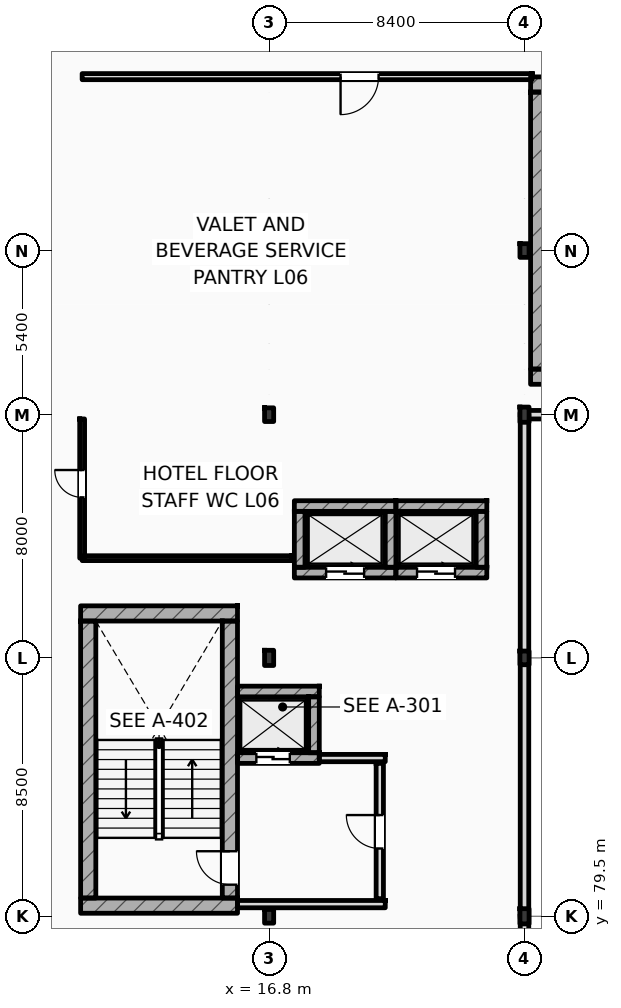
"""IFC4 building model, lengths in metres.
Left out: names, types, materials, properties, quantities, classifications, styles, units other than length and angle.
Written with IfcOpenShell. Run it as: python <this file> out.ifc"""

import sys

from ifc_helpers import new_model, si_unit, direction, frame, frame_2d, origin, origin_2d, place, context, subcontext, project, spatial, rectangle, i_section, extrude, element, fill, save


model = new_model("IFC4")
c1 = context("Model", 3, precision=1e-05, world=origin(), true_north=direction((0.0, 1.0)))
c2 = subcontext(c1, "Body", "Model", "MODEL_VIEW")
j1 = project(units=[si_unit("LENGTHUNIT", "METRE"), si_unit("PLANEANGLEUNIT", "RADIAN")], contexts=[c1])
p1 = place(None, origin())
s1 = spatial("IfcSite", under=j1, at=p1, CompositionType="ELEMENT")
p2 = place(p1, origin())
s2 = spatial("IfcBuilding", under=s1, at=p2, CompositionType="ELEMENT")
p3 = place(p2, frame((0.0, 0.0, 28.2)))
s3 = spatial("IfcBuildingStorey", under=s2, at=p3, CompositionType="ELEMENT", Elevation=28.2)
p4 = place(p3, frame((16.8, 79.5, 0.0), z_axis=(0.0, 0.0, 1.0), x_axis=(1.0, 0.0, 0.0)))
e1 = element("IfcColumn", 1, at=p4, inside=s3, PredefinedType="COLUMN", context=c2, shape_type="SweptSolid", body=[
    extrude(i_section(OverallWidth=0.3, OverallDepth=0.45, WebThickness=0.014, FlangeThickness=0.026, FilletRadius=0.027, at=origin_2d()), origin(), (0.0, 0.0, 1.0), 3.6),
])
p5 = place(p3, frame((16.8, 88.0, 0.0), z_axis=(0.0, 0.0, 1.0), x_axis=(1.0, 0.0, 0.0)))
e2 = element("IfcColumn", 2, at=p5, inside=s3, PredefinedType="COLUMN", context=c2, shape_type="SweptSolid", body=[
    extrude(i_section(OverallWidth=0.3, OverallDepth=0.5, WebThickness=0.014, FlangeThickness=0.028, FilletRadius=0.027, at=origin_2d()), origin(), (0.0, 0.0, 1.0), 3.6),
])
p6 = place(p3, frame((16.8, 96.0, 0.0), z_axis=(0.0, 0.0, 1.0), x_axis=(1.0, 0.0, 0.0)))
e3 = element("IfcColumn", 3, at=p6, inside=s3, PredefinedType="COLUMN", context=c2, shape_type="SweptSolid", body=[
    extrude(i_section(OverallWidth=0.3, OverallDepth=0.45, WebThickness=0.014, FlangeThickness=0.026, FilletRadius=0.027, at=origin_2d()), origin(), (0.0, 0.0, 1.0), 3.6),
])
p7 = place(p3, frame((25.2, 79.5, 0.0), z_axis=(0.0, 0.0, 1.0), x_axis=(1.0, 0.0, 0.0)))
e4 = element("IfcColumn", 4, at=p7, inside=s3, PredefinedType="COLUMN", context=c2, shape_type="SweptSolid", body=[
    extrude(i_section(OverallWidth=0.3, OverallDepth=0.5, WebThickness=0.014, FlangeThickness=0.028, FilletRadius=0.027, at=origin_2d()), origin(), (0.0, 0.0, 1.0), 3.6),
])
p8 = place(p3, frame((25.2, 88.0, 0.0), z_axis=(0.0, 0.0, 1.0), x_axis=(1.0, 0.0, 0.0)))
e5 = element("IfcColumn", 5, at=p8, inside=s3, PredefinedType="COLUMN", context=c2, shape_type="SweptSolid", body=[
    extrude(i_section(OverallWidth=0.3, OverallDepth=0.45, WebThickness=0.014, FlangeThickness=0.026, FilletRadius=0.027, at=origin_2d()), origin(), (0.0, 0.0, 1.0), 3.6),
])
p9 = place(p3, frame((25.2, 96.0, 0.0), z_axis=(0.0, 0.0, 1.0), x_axis=(1.0, 0.0, 0.0)))
e6 = element("IfcColumn", 6, at=p9, inside=s3, PredefinedType="COLUMN", context=c2, shape_type="SweptSolid", body=[
    extrude(i_section(OverallWidth=0.3, OverallDepth=0.5, WebThickness=0.014, FlangeThickness=0.028, FilletRadius=0.027, at=origin_2d()), origin(), (0.0, 0.0, 1.0), 3.6),
])
for number, where, z_axis, x_axis in (
    (7, (16.8, 101.4, 0.0), (0.0, 0.0, 1.0), (1.0, 0.0, 0.0)),
    (8, (25.2, 101.4, 0.0), (0.0, 0.0, 1.0), (1.0, 0.0, 0.0)),
):
    element("IfcColumn", number, at=place(p3, frame(where, z_axis=z_axis, x_axis=x_axis)), inside=s3, PredefinedType="COLUMN", context=c2, shape_type="SweptSolid", body=[
        extrude(i_section(OverallWidth=0.3, OverallDepth=0.45, WebThickness=0.014, FlangeThickness=0.026, FilletRadius=0.027, at=origin_2d()), origin(), (0.0, 0.0, 1.0), 3.6),
    ])
for number, where, z_axis, x_axis in (
    (9, (10.6, 89.462, 0.0), (0.0, 0.0, 1.0), (1.0, 0.0, 0.0)),
    (10, (10.6, 79.85, 0.0), (0.0, 0.0, 1.0), (1.0, 0.0, 0.0)),
):
    element("IfcWall", number, at=place(p3, frame(where, z_axis=z_axis, x_axis=x_axis)), inside=s3, PredefinedType="SHEAR", context=c2, shape_type="SweptSolid", body=[
        extrude(rectangle(XDim=5.16, YDim=0.5, at=frame_2d((2.58, 0.0))), origin(), (0.0, 0.0, 1.0), 3.6),
    ])
p10 = place(p3, frame((10.85, 80.1, 0.0), z_axis=(0.0, 0.0, 1.0), x_axis=(0.0, 1.0, 0.0)))
e11 = element("IfcWall", 11, at=p10, inside=s3, PredefinedType="SHEAR", context=c2, shape_type="SweptSolid", body=[
    extrude(rectangle(XDim=9.112, YDim=0.5, at=frame_2d((4.556, 0.0))), origin(), (0.0, 0.0, 1.0), 3.6),
])
p11 = place(p3, frame((15.51, 80.1, 0.0), z_axis=(0.0, 0.0, 1.0), x_axis=(0.0, 1.0, 0.0)))
e12 = element("IfcWall", 12, at=p11, inside=s3, PredefinedType="SHEAR", context=c2, shape_type="SweptSolid", body=[
    extrude(rectangle(XDim=9.112, YDim=0.5, at=frame_2d((4.556, 0.0))), origin(), (0.0, 0.0, 1.0), 3.6),
])
p12 = place(p11, frame((0.44, 0.0, 0.0)))
e13 = element("IfcOpeningElement", 13, at=p12, cuts=e12, PredefinedType="OPENING", context=c2, shape_type="SweptSolid", body=[
    extrude(rectangle(XDim=1.1, YDim=2.2, at=frame_2d((0.55, 1.1))), frame((0.0, 0.26, 0.0), z_axis=(0.0, -1.0, 0.0), x_axis=(1.0, 0.0, 0.0)), (0.0, 0.0, 1.0), 0.52),
])
for number, where, z_axis, x_axis in (
    (14, (25.4, 106.862, 0.0), (0.0, 0.0, 1.0), (1.0, 0.0, 0.0)),
    (15, (25.4, 97.25, 0.0), (0.0, 0.0, 1.0), (1.0, 0.0, 0.0)),
):
    element("IfcWall", number, at=place(p3, frame(where, z_axis=z_axis, x_axis=x_axis)), inside=s3, PredefinedType="SHEAR", context=c2, shape_type="SweptSolid", body=[
        extrude(rectangle(XDim=5.16, YDim=0.5, at=frame_2d((2.58, 0.0))), origin(), (0.0, 0.0, 1.0), 3.6),
    ])
p13 = place(p3, frame((25.65, 97.5, 0.0), z_axis=(0.0, 0.0, 1.0), x_axis=(0.0, 1.0, 0.0)))
e16 = element("IfcWall", 16, at=p13, inside=s3, PredefinedType="SHEAR", context=c2, shape_type="SweptSolid", body=[
    extrude(rectangle(XDim=9.112, YDim=0.5, at=frame_2d((4.556, 0.0))), origin(), (0.0, 0.0, 1.0), 3.6),
])
p14 = place(p3, frame((25.2, 96.0, 0.0), z_axis=(0.0, 0.0, 1.0), x_axis=(1.0, 0.0, 0.0)))
e17 = element("IfcWall", 17, at=p14, inside=s3, PredefinedType="STANDARD", context=c2, shape_type="SweptSolid", body=[
    extrude(rectangle(XDim=94.8, YDim=0.28, at=frame_2d((47.4, 0.0))), origin(), (0.0, 0.0, 1.0), 2.8),
])
p15 = place(p14, frame((16.454, 0.0, 0.9)))
e18 = element("IfcOpeningElement", 18, at=p15, cuts=e17, PredefinedType="OPENING", context=c2, shape_type="SweptSolid", body=[
    extrude(rectangle(XDim=2.7, YDim=1.72, at=frame_2d((1.35, 0.86))), frame((0.0, 0.15, 0.0), z_axis=(0.0, -1.0, 0.0), x_axis=(1.0, 0.0, 0.0)), (0.0, 0.0, 1.0), 0.3),
])
p16 = place(p14, frame((20.068, 0.0, 0.9)))
e19 = element("IfcOpeningElement", 19, at=p16, cuts=e17, PredefinedType="OPENING", context=c2, shape_type="SweptSolid", body=[
    extrude(rectangle(XDim=2.389, YDim=1.72, at=frame_2d((1.194, 0.86))), frame((0.0, 0.15, 0.0), z_axis=(0.0, -1.0, 0.0), x_axis=(1.0, 0.0, 0.0)), (0.0, 0.0, 1.0), 0.3),
])
p17 = place(p14, frame((24.277, 0.0, 0.9)))
e20 = element("IfcOpeningElement", 20, at=p17, cuts=e17, PredefinedType="OPENING", context=c2, shape_type="SweptSolid", body=[
    extrude(rectangle(XDim=1.8, YDim=1.72, at=frame_2d((0.9, 0.86))), frame((0.0, 0.15, 0.0), z_axis=(0.0, -1.0, 0.0), x_axis=(1.0, 0.0, 0.0)), (0.0, 0.0, 1.0), 0.3),
])
p18 = place(p14, frame((27.885, 0.0, 0.9)))
e21 = element("IfcOpeningElement", 21, at=p18, cuts=e17, PredefinedType="OPENING", context=c2, shape_type="SweptSolid", body=[
    extrude(rectangle(XDim=2.388, YDim=1.72, at=frame_2d((1.194, 0.86))), frame((0.0, 0.15, 0.0), z_axis=(0.0, -1.0, 0.0), x_axis=(1.0, 0.0, 0.0)), (0.0, 0.0, 1.0), 0.3),
])
p19 = place(p14, frame((32.093, 0.0, 0.9)))
e22 = element("IfcOpeningElement", 22, at=p19, cuts=e17, PredefinedType="OPENING", context=c2, shape_type="SweptSolid", body=[
    extrude(rectangle(XDim=1.8, YDim=1.72, at=frame_2d((0.9, 0.86))), frame((0.0, 0.15, 0.0), z_axis=(0.0, -1.0, 0.0), x_axis=(1.0, 0.0, 0.0)), (0.0, 0.0, 1.0), 0.3),
])
p20 = place(p14, frame((35.702, 0.0, 0.9)))
e23 = element("IfcOpeningElement", 23, at=p20, cuts=e17, PredefinedType="OPENING", context=c2, shape_type="SweptSolid", body=[
    extrude(rectangle(XDim=2.488, YDim=1.72, at=frame_2d((1.244, 0.86))), frame((0.0, 0.15, 0.0), z_axis=(0.0, -1.0, 0.0), x_axis=(1.0, 0.0, 0.0)), (0.0, 0.0, 1.0), 0.3),
])
p21 = place(p14, frame((55.56, 0.0, 0.9)))
e24 = element("IfcOpeningElement", 24, at=p21, cuts=e17, PredefinedType="OPENING", context=c2, shape_type="SweptSolid", body=[
    extrude(rectangle(XDim=1.8, YDim=1.72, at=frame_2d((0.9, 0.86))), frame((0.0, 0.15, 0.0), z_axis=(0.0, -1.0, 0.0), x_axis=(1.0, 0.0, 0.0)), (0.0, 0.0, 1.0), 0.3),
])
p22 = place(p14, frame((58.985, 0.0, 0.9)))
e25 = element("IfcOpeningElement", 25, at=p22, cuts=e17, PredefinedType="OPENING", context=c2, shape_type="SweptSolid", body=[
    extrude(rectangle(XDim=1.8, YDim=1.72, at=frame_2d((0.9, 0.86))), frame((0.0, 0.15, 0.0), z_axis=(0.0, -1.0, 0.0), x_axis=(1.0, 0.0, 0.0)), (0.0, 0.0, 1.0), 0.3),
])
p23 = place(p14, frame((63.21, 0.0, 0.9)))
e26 = element("IfcOpeningElement", 26, at=p23, cuts=e17, PredefinedType="OPENING", context=c2, shape_type="SweptSolid", body=[
    extrude(rectangle(XDim=2.525, YDim=1.72, at=frame_2d((1.262, 0.86))), frame((0.0, 0.15, 0.0), z_axis=(0.0, -1.0, 0.0), x_axis=(1.0, 0.0, 0.0)), (0.0, 0.0, 1.0), 0.3),
])
p24 = place(p14, frame((66.955, 0.0, 0.9)))
e27 = element("IfcOpeningElement", 27, at=p24, cuts=e17, PredefinedType="OPENING", context=c2, shape_type="SweptSolid", body=[
    extrude(rectangle(XDim=1.8, YDim=1.72, at=frame_2d((0.9, 0.86))), frame((0.0, 0.15, 0.0), z_axis=(0.0, -1.0, 0.0), x_axis=(1.0, 0.0, 0.0)), (0.0, 0.0, 1.0), 0.3),
])
p25 = place(p14, frame((71.892, 0.0, 0.9)))
e28 = element("IfcOpeningElement", 28, at=p25, cuts=e17, PredefinedType="OPENING", context=c2, shape_type="SweptSolid", body=[
    extrude(rectangle(XDim=1.1, YDim=1.5, at=frame_2d((0.55, 0.75))), frame((0.0, 0.15, 0.0), z_axis=(0.0, -1.0, 0.0), x_axis=(1.0, 0.0, 0.0)), (0.0, 0.0, 1.0), 0.3),
])
p26 = place(p14, frame((75.802, 0.0, 0.9)))
e29 = element("IfcOpeningElement", 29, at=p26, cuts=e17, PredefinedType="OPENING", context=c2, shape_type="SweptSolid", body=[
    extrude(rectangle(XDim=1.25, YDim=1.6, at=frame_2d((0.625, 0.8))), frame((0.0, 0.15, 0.0), z_axis=(0.0, -1.0, 0.0), x_axis=(1.0, 0.0, 0.0)), (0.0, 0.0, 1.0), 0.3),
])
p27 = place(p14, frame((79.712, 0.0, 0.9)))
e30 = element("IfcOpeningElement", 30, at=p27, cuts=e17, PredefinedType="OPENING", context=c2, shape_type="SweptSolid", body=[
    extrude(rectangle(XDim=1.4, YDim=1.7, at=frame_2d((0.7, 0.85))), frame((0.0, 0.15, 0.0), z_axis=(0.0, -1.0, 0.0), x_axis=(1.0, 0.0, 0.0)), (0.0, 0.0, 1.0), 0.3),
])
p28 = place(p14, frame((83.597, 0.0, 0.9)))
e31 = element("IfcOpeningElement", 31, at=p28, cuts=e17, PredefinedType="OPENING", context=c2, shape_type="SweptSolid", body=[
    extrude(rectangle(XDim=1.6, YDim=1.72, at=frame_2d((0.8, 0.86))), frame((0.0, 0.15, 0.0), z_axis=(0.0, -1.0, 0.0), x_axis=(1.0, 0.0, 0.0)), (0.0, 0.0, 1.0), 0.3),
])
p29 = place(p14, frame((87.507, 0.0, 0.9)))
e32 = element("IfcOpeningElement", 32, at=p29, cuts=e17, PredefinedType="OPENING", context=c2, shape_type="SweptSolid", body=[
    extrude(rectangle(XDim=1.75, YDim=1.72, at=frame_2d((0.875, 0.86))), frame((0.0, 0.15, 0.0), z_axis=(0.0, -1.0, 0.0), x_axis=(1.0, 0.0, 0.0)), (0.0, 0.0, 1.0), 0.3),
])
p30 = place(p14, frame((91.328, 0.0, 0.9)))
e33 = element("IfcOpeningElement", 33, at=p30, cuts=e17, PredefinedType="OPENING", context=c2, shape_type="SweptSolid", body=[
    extrude(rectangle(XDim=2.0, YDim=1.72, at=frame_2d((1.0, 0.86))), frame((0.0, 0.15, 0.0), z_axis=(0.0, -1.0, 0.0), x_axis=(1.0, 0.0, 0.0)), (0.0, 0.0, 1.0), 0.3),
])
p31 = place(p3, frame((25.2, 62.5, 0.0), z_axis=(0.0, 0.0, 1.0), x_axis=(0.0, 1.0, 0.0)))
e34 = element("IfcWall", 34, at=p31, inside=s3, PredefinedType="STANDARD", context=c2, shape_type="SweptSolid", body=[
    extrude(rectangle(XDim=17.0, YDim=0.28, at=frame_2d((8.5, 0.0))), origin(), (0.0, 0.0, 1.0), 2.99),
])
p32 = place(p3, frame((25.2, 79.5, 0.0), z_axis=(0.0, 0.0, 1.0), x_axis=(0.0, 1.0, 0.0)))
e35 = element("IfcWall", 35, at=p32, inside=s3, PredefinedType="STANDARD", context=c2, shape_type="SweptSolid", body=[
    extrude(rectangle(XDim=16.5, YDim=0.28, at=frame_2d((8.25, 0.0))), origin(), (0.0, 0.0, 1.0), 2.99),
])
p33 = place(p3, frame((15.76, 86.895, 0.0), z_axis=(0.0, 0.0, 1.0), x_axis=(1.0, 0.0, 0.0)))
e36 = element("IfcWall", 36, at=p33, inside=s3, PredefinedType="SHEAR", context=c2, shape_type="SweptSolid", body=[
    extrude(rectangle(XDim=2.69, YDim=0.35, at=frame_2d((1.345, 0.0))), origin(), (0.0, 0.0, 1.0), 3.36),
])
p34 = place(p3, frame((15.76, 84.705, 0.0), z_axis=(0.0, 0.0, 1.0), x_axis=(1.0, 0.0, 0.0)))
e37 = element("IfcWall", 37, at=p34, inside=s3, PredefinedType="SHEAR", context=c2, shape_type="SweptSolid", body=[
    extrude(rectangle(XDim=2.69, YDim=0.35, at=frame_2d((1.345, 0.0))), origin(), (0.0, 0.0, 1.0), 3.36),
])
p35 = place(p34, frame((0.62, 0.0, 0.0)))
e38 = element("IfcOpeningElement", 38, at=p35, cuts=e37, PredefinedType="OPENING", context=c2, shape_type="SweptSolid", body=[
    extrude(rectangle(XDim=1.1, YDim=2.2, at=frame_2d((0.55, 1.1))), frame((0.0, 0.185, 0.0), z_axis=(0.0, -1.0, 0.0), x_axis=(1.0, 0.0, 0.0)), (0.0, 0.0, 1.0), 0.37),
])
p36 = place(p3, frame((18.275, 84.88, 0.0), z_axis=(0.0, 0.0, 1.0), x_axis=(0.0, 1.0, 0.0)))
e39 = element("IfcWall", 39, at=p36, inside=s3, PredefinedType="SHEAR", context=c2, shape_type="SweptSolid", body=[
    extrude(rectangle(XDim=1.84, YDim=0.35, at=frame_2d((0.92, 0.0))), origin(), (0.0, 0.0, 1.0), 3.36),
])
p37 = place(p3, frame((17.63, 92.995, 0.0), z_axis=(0.0, 0.0, 1.0), x_axis=(1.0, 0.0, 0.0)))
e40 = element("IfcWall", 40, at=p37, inside=s3, PredefinedType="SHEAR", context=c2, shape_type="SweptSolid", body=[
    extrude(rectangle(XDim=3.34, YDim=0.35, at=frame_2d((1.67, 0.0))), origin(), (0.0, 0.0, 1.0), 3.36),
])
p38 = place(p3, frame((17.63, 90.805, 0.0), z_axis=(0.0, 0.0, 1.0), x_axis=(1.0, 0.0, 0.0)))
e41 = element("IfcWall", 41, at=p38, inside=s3, PredefinedType="SHEAR", context=c2, shape_type="SweptSolid", body=[
    extrude(rectangle(XDim=3.34, YDim=0.35, at=frame_2d((1.67, 0.0))), origin(), (0.0, 0.0, 1.0), 3.36),
])
p39 = place(p38, frame((1.045, 0.0, 0.0)))
e42 = element("IfcOpeningElement", 42, at=p39, cuts=e41, PredefinedType="OPENING", context=c2, shape_type="SweptSolid", body=[
    extrude(rectangle(XDim=1.25, YDim=2.25, at=frame_2d((0.625, 1.125))), frame((0.0, 0.185, 0.0), z_axis=(0.0, -1.0, 0.0), x_axis=(1.0, 0.0, 0.0)), (0.0, 0.0, 1.0), 0.37),
])
for number, where, z_axis, x_axis in (
    (43, (17.805, 90.98, 0.0), (0.0, 0.0, 1.0), (0.0, 1.0, 0.0)),
    (44, (20.795, 90.98, 0.0), (0.0, 0.0, 1.0), (0.0, 1.0, 0.0)),
):
    element("IfcWall", number, at=place(p3, frame(where, z_axis=z_axis, x_axis=x_axis)), inside=s3, PredefinedType="SHEAR", context=c2, shape_type="SweptSolid", body=[
        extrude(rectangle(XDim=1.84, YDim=0.35, at=frame_2d((0.92, 0.0))), origin(), (0.0, 0.0, 1.0), 3.36),
    ])
p40 = place(p3, frame((20.97, 92.995, 0.0), z_axis=(0.0, 0.0, 1.0), x_axis=(1.0, 0.0, 0.0)))
e45 = element("IfcWall", 45, at=p40, inside=s3, PredefinedType="SHEAR", context=c2, shape_type="SweptSolid", body=[
    extrude(rectangle(XDim=2.99, YDim=0.35, at=frame_2d((1.495, 0.0))), origin(), (0.0, 0.0, 1.0), 3.36),
])
p41 = place(p3, frame((20.97, 90.805, 0.0), z_axis=(0.0, 0.0, 1.0), x_axis=(1.0, 0.0, 0.0)))
e46 = element("IfcWall", 46, at=p41, inside=s3, PredefinedType="SHEAR", context=c2, shape_type="SweptSolid", body=[
    extrude(rectangle(XDim=2.99, YDim=0.35, at=frame_2d((1.495, 0.0))), origin(), (0.0, 0.0, 1.0), 3.36),
])
p42 = place(p41, frame((0.695, 0.0, 0.0)))
e47 = element("IfcOpeningElement", 47, at=p42, cuts=e46, PredefinedType="OPENING", context=c2, shape_type="SweptSolid", body=[
    extrude(rectangle(XDim=1.25, YDim=2.25, at=frame_2d((0.625, 1.125))), frame((0.0, 0.185, 0.0), z_axis=(0.0, -1.0, 0.0), x_axis=(1.0, 0.0, 0.0)), (0.0, 0.0, 1.0), 0.37),
])
p43 = place(p3, frame((23.785, 90.98, 0.0), z_axis=(0.0, 0.0, 1.0), x_axis=(0.0, 1.0, 0.0)))
e48 = element("IfcWall", 48, at=p43, inside=s3, PredefinedType="SHEAR", context=c2, shape_type="SweptSolid", body=[
    extrude(rectangle(XDim=1.84, YDim=0.35, at=frame_2d((0.92, 0.0))), origin(), (0.0, 0.0, 1.0), 3.36),
])
p44 = place(p3, frame((15.76, 79.9, 0.0), z_axis=(0.0, 0.0, 1.0), x_axis=(1.0, 0.0, 0.0)))
e49 = element("IfcWall", 49, at=p44, inside=s3, PredefinedType="STANDARD", context=c2, shape_type="SweptSolid", body=[
    extrude(rectangle(XDim=4.86, YDim=0.24, at=frame_2d((2.43, 0.0))), origin(), (0.0, 0.0, 1.0), 3.36),
])
p45 = place(p3, frame((18.45, 84.705, 0.0), z_axis=(0.0, 0.0, 1.0), x_axis=(1.0, 0.0, 0.0)))
e50 = element("IfcWall", 50, at=p45, inside=s3, PredefinedType="STANDARD", context=c2, shape_type="SweptSolid", body=[
    extrude(rectangle(XDim=2.17, YDim=0.24, at=frame_2d((1.085, 0.0))), origin(), (0.0, 0.0, 1.0), 3.36),
])
p46 = place(p3, frame((20.44, 80.08, 0.0), z_axis=(0.0, 0.0, 1.0), x_axis=(0.0, 1.0, 0.0)))
e51 = element("IfcWall", 51, at=p46, inside=s3, PredefinedType="STANDARD", context=c2, shape_type="SweptSolid", body=[
    extrude(rectangle(XDim=4.45, YDim=0.24, at=frame_2d((2.225, 0.0))), origin(), (0.0, 0.0, 1.0), 3.36),
])
p47 = place(p46, frame((1.65, 0.0, 0.0)))
e52 = element("IfcOpeningElement", 52, at=p47, cuts=e51, PredefinedType="OPENING", context=c2, shape_type="SweptSolid", body=[
    extrude(rectangle(XDim=1.1, YDim=2.2, at=frame_2d((0.55, 1.1))), frame((0.0, 0.13, 0.0), z_axis=(0.0, -1.0, 0.0), x_axis=(1.0, 0.0, 0.0)), (0.0, 0.0, 1.0), 0.26),
])
p48 = place(p3, frame((10.65, 107.12, 0.0), z_axis=(0.0, 0.0, 1.0), x_axis=(1.0, 0.0, 0.0)))
e53 = element("IfcWall", 53, at=p48, inside=s3, PredefinedType="PARTITIONING", context=c2, shape_type="SweptSolid", body=[
    extrude(rectangle(XDim=14.8, YDim=0.2, at=frame_2d((7.4, 0.0))), origin(), (0.0, 0.0, 1.0), 3.36),
])
p49 = place(p48, frame((8.5, 0.0, 0.0)))
e54 = element("IfcOpeningElement", 54, at=p49, cuts=e53, PredefinedType="OPENING", context=c2, shape_type="SweptSolid", body=[
    extrude(rectangle(XDim=1.25, YDim=2.15, at=frame_2d((0.625, 1.075))), frame((0.0, 0.11, 0.0), z_axis=(0.0, -1.0, 0.0), x_axis=(1.0, 0.0, 0.0)), (0.0, 0.0, 1.0), 0.22),
])
p50 = place(p3, frame((10.65, 91.28, 0.0), z_axis=(0.0, 0.0, 1.0), x_axis=(0.0, 1.0, 0.0)))
e55 = element("IfcWall", 55, at=p50, inside=s3, PredefinedType="PARTITIONING", context=c2, shape_type="SweptSolid", body=[
    extrude(rectangle(XDim=4.58, YDim=0.16, at=frame_2d((2.29, 0.0))), origin(), (0.0, 0.0, 1.0), 3.36),
])
p51 = place(p50, frame((2.0, 0.0, 0.0)))
e56 = element("IfcOpeningElement", 56, at=p51, cuts=e55, PredefinedType="OPENING", context=c2, shape_type="SweptSolid", body=[
    extrude(rectangle(XDim=0.9, YDim=2.1, at=frame_2d((0.45, 1.05))), frame((0.0, 0.09, 0.0), z_axis=(0.0, -1.0, 0.0), x_axis=(1.0, 0.0, 0.0)), (0.0, 0.0, 1.0), 0.18),
])
p52 = place(p3, frame((10.65, 91.28, 0.0), z_axis=(0.0, 0.0, 1.0), x_axis=(1.0, 0.0, 0.0)))
e57 = element("IfcWall", 57, at=p52, inside=s3, PredefinedType="PARTITIONING", context=c2, shape_type="SweptSolid", body=[
    extrude(rectangle(XDim=6.9, YDim=0.16, at=frame_2d((3.45, 0.0))), origin(), (0.0, 0.0, 1.0), 3.36),
])
p53 = place(p12, origin())
e58 = element("IfcDoor", 58, at=p53, inside=s3, OperationType="SINGLE_SWING_RIGHT", PredefinedType="DOOR", context=c2, shape_type="SweptSolid", body=[
    extrude(rectangle(XDim=1.1, YDim=2.2, at=frame_2d((0.55, 1.1))), frame((0.0, 0.025, 0.0), z_axis=(0.0, -1.0, 0.0), x_axis=(1.0, 0.0, 0.0)), (0.0, 0.0, 1.0), 0.05),
])
fill(e13, e58)
p54 = place(p35, origin())
e59 = element("IfcDoor", 59, at=p54, inside=s3, OperationType="SLIDING_TO_LEFT", PredefinedType="DOOR", context=c2, shape_type="SweptSolid", body=[
    extrude(rectangle(XDim=1.1, YDim=2.2, at=frame_2d((0.55, 1.1))), frame((0.0, 0.025, 0.0), z_axis=(0.0, -1.0, 0.0), x_axis=(1.0, 0.0, 0.0)), (0.0, 0.0, 1.0), 0.05),
])
fill(e38, e59)
p55 = place(p39, origin())
e60 = element("IfcDoor", 60, at=p55, inside=s3, OperationType="SLIDING_TO_LEFT", PredefinedType="DOOR", context=c2, shape_type="SweptSolid", body=[
    extrude(rectangle(XDim=1.25, YDim=2.25, at=frame_2d((0.625, 1.125))), frame((0.0, 0.025, 0.0), z_axis=(0.0, -1.0, 0.0), x_axis=(1.0, 0.0, 0.0)), (0.0, 0.0, 1.0), 0.05),
])
fill(e42, e60)
p56 = place(p42, origin())
e61 = element("IfcDoor", 61, at=p56, inside=s3, OperationType="SLIDING_TO_LEFT", PredefinedType="DOOR", context=c2, shape_type="SweptSolid", body=[
    extrude(rectangle(XDim=1.25, YDim=2.25, at=frame_2d((0.625, 1.125))), frame((0.0, 0.025, 0.0), z_axis=(0.0, -1.0, 0.0), x_axis=(1.0, 0.0, 0.0)), (0.0, 0.0, 1.0), 0.05),
])
fill(e47, e61)
p57 = place(p47, origin())
e62 = element("IfcDoor", 62, at=p57, inside=s3, OperationType="SINGLE_SWING_RIGHT", PredefinedType="DOOR", context=c2, shape_type="SweptSolid", body=[
    extrude(rectangle(XDim=1.1, YDim=2.2, at=frame_2d((0.55, 1.1))), frame((0.0, 0.025, 0.0), z_axis=(0.0, -1.0, 0.0), x_axis=(1.0, 0.0, 0.0)), (0.0, 0.0, 1.0), 0.05),
])
fill(e52, e62)
p58 = place(p51, origin())
e63 = element("IfcDoor", 63, at=p58, inside=s3, OperationType="SINGLE_SWING_RIGHT", PredefinedType="DOOR", context=c2, shape_type="SweptSolid", body=[
    extrude(rectangle(XDim=0.9, YDim=2.1, at=frame_2d((0.45, 1.05))), frame((0.0, 0.025, 0.0), z_axis=(0.0, -1.0, 0.0), x_axis=(1.0, 0.0, 0.0)), (0.0, 0.0, 1.0), 0.05),
])
fill(e56, e63)
p59 = place(p49, frame((1.25, 0.0, 0.0), z_axis=(0.0, 0.0, 1.0), x_axis=(-1.0, 0.0, 0.0)))
e64 = element("IfcDoor", 64, at=p59, inside=s3, OperationType="SINGLE_SWING_LEFT", PredefinedType="DOOR", context=c2, shape_type="SweptSolid", body=[
    extrude(rectangle(XDim=1.25, YDim=2.15, at=frame_2d((0.625, 1.075))), frame((0.0, 0.025, 0.0), z_axis=(0.0, -1.0, 0.0), x_axis=(1.0, 0.0, 0.0)), (0.0, 0.0, 1.0), 0.05),
])
fill(e54, e64)
save(model, sys.argv[1])
